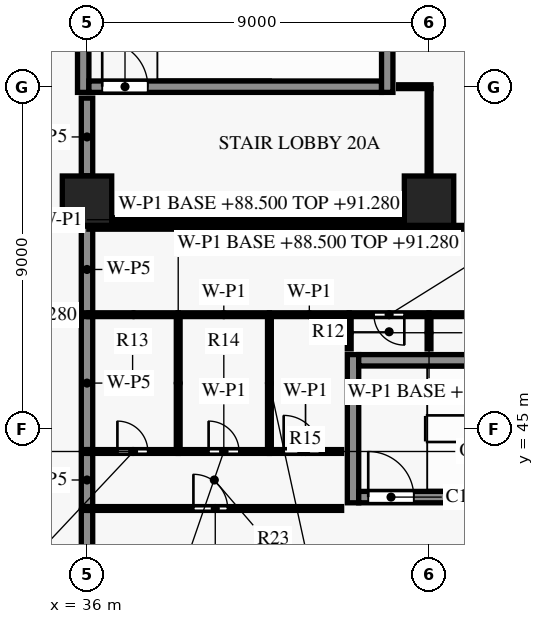
"""IFC4 building model, lengths in metres.
Left out: names, types, materials, properties, quantities, classifications, styles, units other than length and angle.
Written with IfcOpenShell. Run it as: python <this file> out.ifc"""

import sys

from ifc_helpers import new_model, si_unit, direction, frame, frame_2d, origin, origin_2d, place, context, subcontext, project, spatial, rectangle, extrude, element, fill, save


model = new_model("IFC4")
c1 = context("Model", 3, precision=1e-05, world=origin(), true_north=direction((0.0, 1.0)))
c2 = subcontext(c1, "Body", "Model", "MODEL_VIEW")
j1 = project(units=[si_unit("LENGTHUNIT", "METRE"), si_unit("PLANEANGLEUNIT", "RADIAN")], contexts=[c1])
p1 = place(None, origin())
s1 = spatial("IfcSite", under=j1, at=p1, CompositionType="ELEMENT")
p2 = place(p1, origin())
s2 = spatial("IfcBuilding", under=s1, at=p2, CompositionType="ELEMENT")
p3 = place(p2, frame((0.0, 0.0, 88.5)))
s3 = spatial("IfcBuildingStorey", under=s2, at=p3, CompositionType="ELEMENT", Elevation=88.5)
for number, where, z_axis, x_axis in (
    (1, (36.0, 51.0, 0.0), (0.0, 0.0, 1.0), (1.0, 0.0, 0.0)),
    (2, (45.0, 51.0, 0.0), (0.0, 0.0, 1.0), (1.0, 0.0, 0.0)),
):
    element("IfcColumn", number, at=place(p3, frame(where, z_axis=z_axis, x_axis=x_axis)), inside=s3, PredefinedType="COLUMN", context=c2, shape_type="SweptSolid", body=[
        extrude(rectangle(XDim=1.3, YDim=1.3, at=origin_2d()), origin(), (0.0, 0.0, 1.0), 3.8),
    ])
p4 = place(p3, frame((43.15, 43.2, 0.0), z_axis=(0.0, 0.0, 1.0), x_axis=(1.0, 0.0, 0.0)))
e3 = element("IfcWall", 3, at=p4, inside=s3, PredefinedType="SHEAR", context=c2, shape_type="SweptSolid", body=[
    extrude(rectangle(XDim=7.7, YDim=0.3, at=frame_2d((3.85, 0.0))), origin(), (0.0, 0.0, 1.0), 3.5),
])
p5 = place(p4, frame((0.25, 0.0, 0.0)))
e4 = element("IfcOpeningElement", 4, at=p5, cuts=e3, PredefinedType="OPENING", context=c2, shape_type="SweptSolid", body=[
    extrude(rectangle(XDim=1.2, YDim=2.2, at=frame_2d((0.6, 1.1))), frame((0.0, 0.16, 0.0), z_axis=(0.0, -1.0, 0.0), x_axis=(1.0, 0.0, 0.0)), (0.0, 0.0, 1.0), 0.32),
])
p6 = place(p3, frame((43.15, 46.8, 0.0), z_axis=(0.0, 0.0, 1.0), x_axis=(1.0, 0.0, 0.0)))
e5 = element("IfcWall", 5, at=p6, inside=s3, PredefinedType="SHEAR", context=c2, shape_type="SweptSolid", body=[
    extrude(rectangle(XDim=7.7, YDim=0.3, at=frame_2d((3.85, 0.0))), origin(), (0.0, 0.0, 1.0), 3.5),
])
p7 = place(p3, frame((36.05, 54.0, 0.0), z_axis=(0.0, 0.0, 1.0), x_axis=(1.0, 0.0, 0.0)))
e6 = element("IfcWall", 6, at=p7, inside=s3, PredefinedType="SHEAR", context=c2, shape_type="SweptSolid", body=[
    extrude(rectangle(XDim=7.7, YDim=0.3, at=frame_2d((3.85, 0.0))), origin(), (0.0, 0.0, 1.0), 3.5),
])
p8 = place(p7, frame((0.35, 0.0, 0.0)))
e7 = element("IfcOpeningElement", 7, at=p8, cuts=e6, PredefinedType="OPENING", context=c2, shape_type="SweptSolid", body=[
    extrude(rectangle(XDim=1.2, YDim=2.2, at=frame_2d((0.6, 1.1))), frame((0.0, 0.16, 0.0), z_axis=(0.0, -1.0, 0.0), x_axis=(1.0, 0.0, 0.0)), (0.0, 0.0, 1.0), 0.32),
])
for number, where, z_axis, x_axis in (
    (8, (35.9, 53.85, 0.0), (0.0, 0.0, 1.0), (0.0, 1.0, 0.0)),
    (9, (43.0, 43.05, 0.0), (0.0, 0.0, 1.0), (0.0, 1.0, 0.0)),
    (10, (43.9, 53.85, 0.0), (0.0, 0.0, 1.0), (0.0, 1.0, 0.0)),
):
    element("IfcWall", number, at=place(p3, frame(where, z_axis=z_axis, x_axis=x_axis)), inside=s3, PredefinedType="SHEAR", context=c2, shape_type="SweptSolid", body=[
        extrude(rectangle(XDim=3.9, YDim=0.3, at=frame_2d((1.95, 0.0))), origin(), (0.0, 0.0, 1.0), 3.5),
    ])
p9 = place(p3, frame((36.0, 39.67, 0.0), z_axis=(0.0, 0.0, 1.0), x_axis=(0.0, 1.0, 0.0)))
e11 = element("IfcWall", 11, at=p9, inside=s3, PredefinedType="PARTITIONING", context=c2, shape_type="SweptSolid", body=[
    extrude(rectangle(XDim=3.18, YDim=0.3, at=frame_2d((1.59, 0.0))), origin(), (0.0, 0.0, 1.0), 2.78),
])
p10 = place(p3, frame((36.05, 42.9, 0.0), z_axis=(0.0, 0.0, 1.0), x_axis=(1.0, 0.0, 0.0)))
e12 = element("IfcWall", 12, at=p10, inside=s3, PredefinedType="PARTITIONING", context=c2, shape_type="SweptSolid", body=[
    extrude(rectangle(XDim=6.65, YDim=0.1, at=frame_2d((3.325, 0.0))), origin(), (0.0, 0.0, 1.0), 2.78),
])
p11 = place(p10, frame((2.75, 0.0, 0.0)))
e13 = element("IfcOpeningElement", 13, at=p11, cuts=e12, PredefinedType="OPENING", context=c2, shape_type="SweptSolid", body=[
    extrude(rectangle(XDim=0.9, YDim=2.1, at=frame_2d((0.45, 1.05))), frame((0.0, 0.06, 0.0), z_axis=(0.0, -1.0, 0.0), x_axis=(1.0, 0.0, 0.0)), (0.0, 0.0, 1.0), 0.12),
])
p12 = place(p3, frame((36.0, 42.95, 0.0), z_axis=(0.0, 0.0, 1.0), x_axis=(0.0, 1.0, 0.0)))
e14 = element("IfcWall", 14, at=p12, inside=s3, PredefinedType="PARTITIONING", context=c2, shape_type="SweptSolid", body=[
    extrude(rectangle(XDim=1.4, YDim=0.3, at=frame_2d((0.7, 0.0))), origin(), (0.0, 0.0, 1.0), 2.78),
])
p13 = place(p3, frame((36.05, 44.4, 0.0), z_axis=(0.0, 0.0, 1.0), x_axis=(1.0, 0.0, 0.0)))
e15 = element("IfcWall", 15, at=p13, inside=s3, PredefinedType="PARTITIONING", context=c2, shape_type="SweptSolid", body=[
    extrude(rectangle(XDim=2.35, YDim=0.1, at=frame_2d((1.175, 0.0))), origin(), (0.0, 0.0, 1.0), 2.78),
])
p14 = place(p13, frame((0.75, 0.0, 0.0)))
e16 = element("IfcOpeningElement", 16, at=p14, cuts=e15, PredefinedType="OPENING", context=c2, shape_type="SweptSolid", body=[
    extrude(rectangle(XDim=0.8, YDim=2.1, at=frame_2d((0.4, 1.05))), frame((0.0, 0.06, 0.0), z_axis=(0.0, -1.0, 0.0), x_axis=(1.0, 0.0, 0.0)), (0.0, 0.0, 1.0), 0.12),
])
p15 = place(p3, frame((38.4, 44.4, 0.0), z_axis=(0.0, 0.0, 1.0), x_axis=(1.0, 0.0, 0.0)))
e17 = element("IfcWall", 17, at=p15, inside=s3, PredefinedType="PARTITIONING", context=c2, shape_type="SweptSolid", body=[
    extrude(rectangle(XDim=2.4, YDim=0.1, at=frame_2d((1.2, 0.0))), origin(), (0.0, 0.0, 1.0), 3.48),
])
p16 = place(p15, frame((0.8, 0.0, 0.0)))
e18 = element("IfcOpeningElement", 18, at=p16, cuts=e17, PredefinedType="OPENING", context=c2, shape_type="SweptSolid", body=[
    extrude(rectangle(XDim=0.8, YDim=2.1, at=frame_2d((0.4, 1.05))), frame((0.0, 0.06, 0.0), z_axis=(0.0, -1.0, 0.0), x_axis=(1.0, 0.0, 0.0)), (0.0, 0.0, 1.0), 0.12),
])
p17 = place(p3, frame((40.8, 44.4, 0.0), z_axis=(0.0, 0.0, 1.0), x_axis=(1.0, 0.0, 0.0)))
e19 = element("IfcWall", 19, at=p17, inside=s3, PredefinedType="PARTITIONING", context=c2, shape_type="SweptSolid", body=[
    extrude(rectangle(XDim=1.9, YDim=0.1, at=frame_2d((0.95, 0.0))), origin(), (0.0, 0.0, 1.0), 3.48),
])
p18 = place(p17, frame((0.375, 0.0, 0.0)))
e20 = element("IfcOpeningElement", 20, at=p18, cuts=e19, PredefinedType="OPENING", context=c2, shape_type="SweptSolid", body=[
    extrude(rectangle(XDim=0.95, YDim=2.1, at=frame_2d((0.475, 1.05))), frame((0.0, 0.06, 0.0), z_axis=(0.0, -1.0, 0.0), x_axis=(1.0, 0.0, 0.0)), (0.0, 0.0, 1.0), 0.12),
])
p19 = place(p3, frame((36.0, 44.45, 0.0), z_axis=(0.0, 0.0, 1.0), x_axis=(0.0, 1.0, 0.0)))
e21 = element("IfcWall", 21, at=p19, inside=s3, PredefinedType="PARTITIONING", context=c2, shape_type="SweptSolid", body=[
    extrude(rectangle(XDim=3.5, YDim=0.3, at=frame_2d((1.75, 0.0))), origin(), (0.0, 0.0, 1.0), 2.78),
])
for number, where, z_axis, x_axis in (
    (22, (38.4, 47.95, 0.0), (0.0, 0.0, 1.0), (0.0, -1.0, 0.0)),
    (23, (40.8, 47.95, 0.0), (0.0, 0.0, 1.0), (0.0, -1.0, 0.0)),
):
    element("IfcWall", number, at=place(p3, frame(where, z_axis=z_axis, x_axis=x_axis)), inside=s3, PredefinedType="PARTITIONING", context=c2, shape_type="SweptSolid", body=[
        extrude(rectangle(XDim=3.5, YDim=0.1, at=frame_2d((1.75, 0.0))), origin(), (0.0, 0.0, 1.0), 2.78),
    ])
for number, where, z_axis, x_axis in (
    (24, (42.9, 47.95, 0.0), (0.0, 0.0, 1.0), (0.0, -1.0, 0.0)),
    (25, (45.0, 47.95, 0.0), (0.0, 0.0, 1.0), (0.0, -1.0, 0.0)),
):
    element("IfcWall", number, at=place(p3, frame(where, z_axis=z_axis, x_axis=x_axis)), inside=s3, PredefinedType="PARTITIONING", context=c2, shape_type="SweptSolid", body=[
        extrude(rectangle(XDim=0.85, YDim=0.1, at=frame_2d((0.425, 0.0))), origin(), (0.0, 0.0, 1.0), 2.78),
    ])
p20 = place(p3, frame((38.4, 48.0, 0.0), z_axis=(0.0, 0.0, 1.0), x_axis=(-1.0, 0.0, 0.0)))
e26 = element("IfcWall", 26, at=p20, inside=s3, PredefinedType="PARTITIONING", context=c2, shape_type="SweptSolid", body=[
    extrude(rectangle(XDim=2.35, YDim=0.1, at=frame_2d((1.175, 0.0))), origin(), (0.0, 0.0, 1.0), 2.78),
])
p21 = place(p3, frame((40.8, 48.0, 0.0), z_axis=(0.0, 0.0, 1.0), x_axis=(-1.0, 0.0, 0.0)))
e27 = element("IfcWall", 27, at=p21, inside=s3, PredefinedType="PARTITIONING", context=c2, shape_type="SweptSolid", body=[
    extrude(rectangle(XDim=2.4, YDim=0.1, at=frame_2d((1.2, 0.0))), origin(), (0.0, 0.0, 1.0), 3.48),
])
p22 = place(p3, frame((42.9, 48.0, 0.0), z_axis=(0.0, 0.0, 1.0), x_axis=(-1.0, 0.0, 0.0)))
e28 = element("IfcWall", 28, at=p22, inside=s3, PredefinedType="PARTITIONING", context=c2, shape_type="SweptSolid", body=[
    extrude(rectangle(XDim=2.1, YDim=0.1, at=frame_2d((1.05, 0.0))), origin(), (0.0, 0.0, 1.0), 3.48),
])
p23 = place(p3, frame((45.0, 48.0, 0.0), z_axis=(0.0, 0.0, 1.0), x_axis=(-1.0, 0.0, 0.0)))
e29 = element("IfcWall", 29, at=p23, inside=s3, PredefinedType="PARTITIONING", context=c2, shape_type="SweptSolid", body=[
    extrude(rectangle(XDim=2.1, YDim=0.1, at=frame_2d((1.05, 0.0))), origin(), (0.0, 0.0, 1.0), 2.88),
])
p24 = place(p23, frame((0.65, 0.0, 0.0)))
e30 = element("IfcOpeningElement", 30, at=p24, cuts=e29, PredefinedType="OPENING", context=c2, shape_type="SweptSolid", body=[
    extrude(rectangle(XDim=0.8, YDim=2.1, at=frame_2d((0.4, 1.05))), frame((0.0, 0.06, 0.0), z_axis=(0.0, -1.0, 0.0), x_axis=(1.0, 0.0, 0.0)), (0.0, 0.0, 1.0), 0.12),
])
p25 = place(p3, frame((54.0, 48.0, 0.0), z_axis=(0.0, 0.0, 1.0), x_axis=(-1.0, 0.0, 0.0)))
e31 = element("IfcWall", 31, at=p25, inside=s3, PredefinedType="PARTITIONING", context=c2, shape_type="SweptSolid", body=[
    extrude(rectangle(XDim=9.0, YDim=0.1, at=frame_2d((4.5, 0.0))), origin(), (0.0, 0.0, 1.0), 2.88),
])
p26 = place(p3, frame((36.0, 48.05, 0.0), z_axis=(0.0, 0.0, 1.0), x_axis=(0.0, 1.0, 0.0)))
e32 = element("IfcWall", 32, at=p26, inside=s3, PredefinedType="PARTITIONING", context=c2, shape_type="SweptSolid", body=[
    extrude(rectangle(XDim=2.28, YDim=0.3, at=frame_2d((1.14, 0.0))), origin(), (0.0, 0.0, 1.0), 2.78),
])
p27 = place(p3, frame((36.05, 50.3, 0.0), z_axis=(0.0, 0.0, 1.0), x_axis=(1.0, 0.0, 0.0)))
e33 = element("IfcWall", 33, at=p27, inside=s3, PredefinedType="PARTITIONING", context=c2, shape_type="SweptSolid", body=[
    extrude(rectangle(XDim=8.95, YDim=0.1, at=frame_2d((4.475, 0.0))), origin(), (0.0, 0.0, 1.0), 2.78),
])
p28 = place(p3, frame((45.0, 50.3, 0.0), z_axis=(0.0, 0.0, 1.0), x_axis=(1.0, 0.0, 0.0)))
e34 = element("IfcWall", 34, at=p28, inside=s3, PredefinedType="PARTITIONING", context=c2, shape_type="SweptSolid", body=[
    extrude(rectangle(XDim=13.5, YDim=0.1, at=frame_2d((6.75, 0.0))), origin(), (0.0, 0.0, 1.0), 2.88),
])
p29 = place(p28, frame((4.05, 0.0, 0.0)))
e35 = element("IfcOpeningElement", 35, at=p29, cuts=e34, PredefinedType="OPENING", context=c2, shape_type="SweptSolid", body=[
    extrude(rectangle(XDim=0.9, YDim=2.1, at=frame_2d((0.45, 1.05))), frame((0.0, 0.06, 0.0), z_axis=(0.0, -1.0, 0.0), x_axis=(1.0, 0.0, 0.0)), (0.0, 0.0, 1.0), 0.12),
])
p30 = place(p3, frame((44.345, 50.5, 0.0), z_axis=(0.0, 0.0, 1.0), x_axis=(-1.0, 0.0, 0.0)))
e36 = element("IfcWall", 36, at=p30, inside=s3, PredefinedType="PARTITIONING", context=c2, shape_type="SweptSolid", body=[
    extrude(rectangle(XDim=7.69, YDim=0.1, at=frame_2d((3.845, 0.0))), origin(), (0.0, 0.0, 1.0), 3.48),
])
p31 = place(p3, frame((36.0, 51.655, 0.0), z_axis=(0.0, 0.0, 1.0), x_axis=(0.0, 1.0, 0.0)))
e37 = element("IfcWall", 37, at=p31, inside=s3, PredefinedType="PARTITIONING", context=c2, shape_type="SweptSolid", body=[
    extrude(rectangle(XDim=2.045, YDim=0.3, at=frame_2d((1.022, 0.0))), origin(), (0.0, 0.0, 1.0), 2.78),
])
p32 = place(p3, frame((45.0, 53.95, 0.0), z_axis=(0.0, 0.0, 1.0), x_axis=(0.0, -1.0, 0.0)))
e38 = element("IfcWall", 38, at=p32, inside=s3, PredefinedType="PARTITIONING", context=c2, shape_type="SweptSolid", body=[
    extrude(rectangle(XDim=2.295, YDim=0.1, at=frame_2d((1.147, 0.0))), origin(), (0.0, 0.0, 1.0), 2.88),
])
p33 = place(p3, frame((44.2, 54.0, 0.0), z_axis=(0.0, 0.0, 1.0), x_axis=(1.0, 0.0, 0.0)))
e39 = element("IfcWall", 39, at=p33, inside=s3, PredefinedType="PARTITIONING", context=c2, shape_type="SweptSolid", body=[
    extrude(rectangle(XDim=0.85, YDim=0.1, at=frame_2d((0.425, 0.0))), origin(), (0.0, 0.0, 1.0), 2.88),
])
p34 = place(p8, origin())
e40 = element("IfcDoor", 40, at=p34, inside=s3, OperationType="SINGLE_SWING_LEFT", PredefinedType="DOOR", context=c2, shape_type="SweptSolid", body=[
    extrude(rectangle(XDim=1.2, YDim=2.2, at=frame_2d((0.6, 1.1))), frame((0.0, 0.025, 0.0), z_axis=(0.0, -1.0, 0.0), x_axis=(1.0, 0.0, 0.0)), (0.0, 0.0, 1.0), 0.05),
])
fill(e7, e40)
p35 = place(p5, origin())
e41 = element("IfcDoor", 41, at=p35, inside=s3, OperationType="SINGLE_SWING_RIGHT", PredefinedType="DOOR", context=c2, shape_type="SweptSolid", body=[
    extrude(rectangle(XDim=1.2, YDim=2.2, at=frame_2d((0.6, 1.1))), frame((0.0, 0.025, 0.0), z_axis=(0.0, -1.0, 0.0), x_axis=(1.0, 0.0, 0.0)), (0.0, 0.0, 1.0), 0.05),
])
fill(e4, e41)
p36 = place(p11, origin())
e42 = element("IfcDoor", 42, at=p36, inside=s3, OperationType="SINGLE_SWING_LEFT", PredefinedType="DOOR", context=c2, shape_type="SweptSolid", body=[
    extrude(rectangle(XDim=0.9, YDim=2.1, at=frame_2d((0.45, 1.05))), frame((0.0, 0.025, 0.0), z_axis=(0.0, -1.0, 0.0), x_axis=(1.0, 0.0, 0.0)), (0.0, 0.0, 1.0), 0.05),
])
fill(e13, e42)
p37 = place(p14, origin())
e43 = element("IfcDoor", 43, at=p37, inside=s3, OperationType="SINGLE_SWING_LEFT", PredefinedType="DOOR", context=c2, shape_type="SweptSolid", body=[
    extrude(rectangle(XDim=0.8, YDim=2.1, at=frame_2d((0.4, 1.05))), frame((0.0, 0.025, 0.0), z_axis=(0.0, -1.0, 0.0), x_axis=(1.0, 0.0, 0.0)), (0.0, 0.0, 1.0), 0.05),
])
fill(e16, e43)
p38 = place(p16, origin())
e44 = element("IfcDoor", 44, at=p38, inside=s3, OperationType="SINGLE_SWING_RIGHT", PredefinedType="DOOR", context=c2, shape_type="SweptSolid", body=[
    extrude(rectangle(XDim=0.8, YDim=2.1, at=frame_2d((0.4, 1.05))), frame((0.0, 0.025, 0.0), z_axis=(0.0, -1.0, 0.0), x_axis=(1.0, 0.0, 0.0)), (0.0, 0.0, 1.0), 0.05),
])
fill(e18, e44)
p39 = place(p18, origin())
e45 = element("IfcDoor", 45, at=p39, inside=s3, OperationType="SINGLE_SWING_LEFT", PredefinedType="DOOR", context=c2, shape_type="SweptSolid", body=[
    extrude(rectangle(XDim=0.95, YDim=2.1, at=frame_2d((0.475, 1.05))), frame((0.0, 0.025, 0.0), z_axis=(0.0, -1.0, 0.0), x_axis=(1.0, 0.0, 0.0)), (0.0, 0.0, 1.0), 0.05),
])
fill(e20, e45)
p40 = place(p24, origin())
e46 = element("IfcDoor", 46, at=p40, inside=s3, OperationType="SINGLE_SWING_LEFT", PredefinedType="DOOR", context=c2, shape_type="SweptSolid", body=[
    extrude(rectangle(XDim=0.8, YDim=2.1, at=frame_2d((0.4, 1.05))), frame((0.0, 0.025, 0.0), z_axis=(0.0, -1.0, 0.0), x_axis=(1.0, 0.0, 0.0)), (0.0, 0.0, 1.0), 0.05),
])
fill(e30, e46)
save(model, sys.argv[1])
